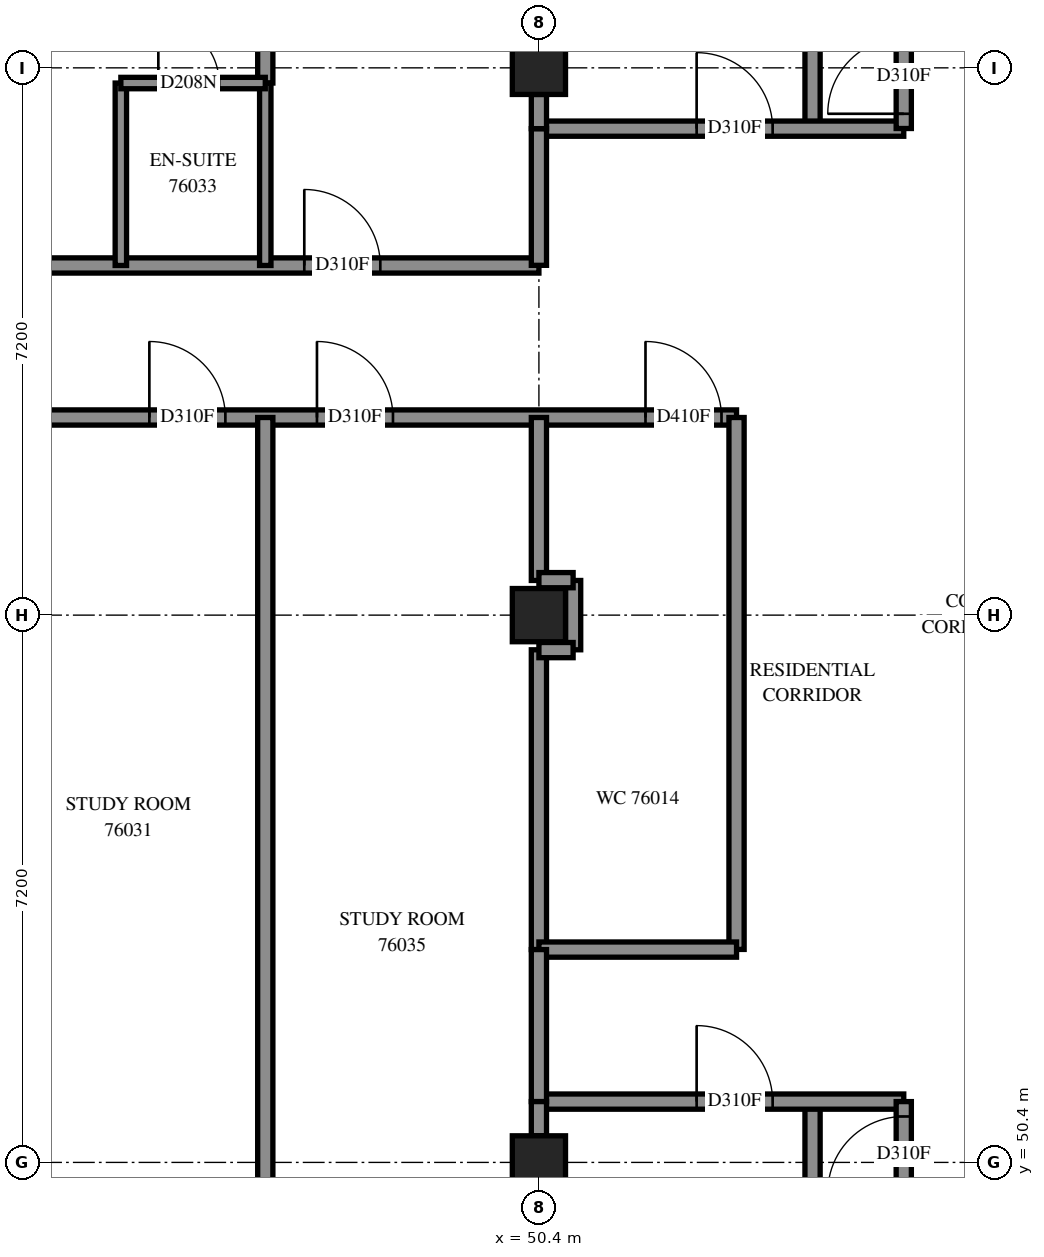
"""IFC4 building model, lengths in metres.
Left out: names, types, materials, properties, quantities, classifications, styles, units other than length and angle.
Written with IfcOpenShell. Run it as: python <this file> out.ifc"""

import sys

from ifc_helpers import new_model, si_unit, direction, frame, frame_2d, origin, origin_2d, place, context, subcontext, project, spatial, rectangle, extrude, element, fill, save


model = new_model("IFC4")
c1 = context("Model", 3, precision=1e-05, world=origin(), true_north=direction((0.0, 1.0)))
c2 = subcontext(c1, "Body", "Model", "MODEL_VIEW")
j1 = project(units=[si_unit("LENGTHUNIT", "METRE"), si_unit("PLANEANGLEUNIT", "RADIAN")], contexts=[c1])
p1 = place(None, origin())
s1 = spatial("IfcSite", under=j1, at=p1, CompositionType="ELEMENT")
p2 = place(p1, origin())
s2 = spatial("IfcBuilding", under=s1, at=p2, CompositionType="ELEMENT")
p3 = place(p2, frame((0.0, 0.0, 277.8)))
s3 = spatial("IfcBuildingStorey", under=s2, at=p3, CompositionType="ELEMENT", Elevation=277.8)
for number, where, z_axis, x_axis in (
    (1, (50.4, 50.4, 0.0), (0.0, 0.0, 1.0), (1.0, 0.0, 0.0)),
    (2, (50.4, 57.6, 0.0), (0.0, 0.0, 1.0), (1.0, 0.0, 0.0)),
    (3, (50.4, 64.8, 0.0), (0.0, 0.0, 1.0), (1.0, 0.0, 0.0)),
):
    element("IfcColumn", number, at=place(p3, frame(where, z_axis=z_axis, x_axis=x_axis)), inside=s3, PredefinedType="COLUMN", context=c2, shape_type="SweptSolid", body=[
        extrude(rectangle(XDim=0.7, YDim=0.7, at=origin_2d()), origin(), (0.0, 0.0, 1.0), 3.1),
    ])
p4 = place(p3, frame((36.0, 60.2, 0.0), z_axis=(0.0, 0.0, 1.0), x_axis=(1.0, 0.0, 0.0)))
e4 = element("IfcWall", 4, at=p4, inside=s3, PredefinedType="PARTITIONING", context=c2, shape_type="SweptSolid", body=[
    extrude(rectangle(XDim=17.0, YDim=0.2, at=frame_2d((8.5, 0.0))), origin(), (0.0, 0.0, 1.0), 3.1),
])
p5 = place(p4, frame((15.802, 0.0, 0.0)))
e5 = element("IfcOpeningElement", 5, at=p5, cuts=e4, PredefinedType="OPENING", context=c2, shape_type="SweptSolid", body=[
    extrude(rectangle(XDim=1.0, YDim=2.1, at=frame_2d((0.5, 1.05))), frame((0.0, 0.11, 0.0), z_axis=(0.0, -1.0, 0.0), x_axis=(1.0, 0.0, 0.0)), (0.0, 0.0, 1.0), 0.22),
])
p6 = place(p4, frame((2.075, 0.0, 0.0)))
e6 = element("IfcOpeningElement", 6, at=p6, cuts=e4, PredefinedType="OPENING", context=c2, shape_type="SweptSolid", body=[
    extrude(rectangle(XDim=1.0, YDim=2.1, at=frame_2d((0.5, 1.05))), frame((0.0, 0.11, 0.0), z_axis=(0.0, -1.0, 0.0), x_axis=(1.0, 0.0, 0.0)), (0.0, 0.0, 1.0), 0.22),
])
p7 = place(p4, frame((4.125, 0.0, 0.0)))
e7 = element("IfcOpeningElement", 7, at=p7, cuts=e4, PredefinedType="OPENING", context=c2, shape_type="SweptSolid", body=[
    extrude(rectangle(XDim=1.0, YDim=2.1, at=frame_2d((0.5, 1.05))), frame((0.0, 0.11, 0.0), z_axis=(0.0, -1.0, 0.0), x_axis=(1.0, 0.0, 0.0)), (0.0, 0.0, 1.0), 0.22),
])
p8 = place(p4, frame((9.275, 0.0, 0.0)))
e8 = element("IfcOpeningElement", 8, at=p8, cuts=e4, PredefinedType="OPENING", context=c2, shape_type="SweptSolid", body=[
    extrude(rectangle(XDim=1.0, YDim=2.1, at=frame_2d((0.5, 1.05))), frame((0.0, 0.11, 0.0), z_axis=(0.0, -1.0, 0.0), x_axis=(1.0, 0.0, 0.0)), (0.0, 0.0, 1.0), 0.22),
])
p9 = place(p4, frame((11.48, 0.0, 0.0)))
e9 = element("IfcOpeningElement", 9, at=p9, cuts=e4, PredefinedType="OPENING", context=c2, shape_type="SweptSolid", body=[
    extrude(rectangle(XDim=1.0, YDim=2.1, at=frame_2d((0.5, 1.05))), frame((0.0, 0.11, 0.0), z_axis=(0.0, -1.0, 0.0), x_axis=(1.0, 0.0, 0.0)), (0.0, 0.0, 1.0), 0.22),
])
p10 = place(p3, frame((46.8, 49.65, 0.0), z_axis=(0.0, 0.0, 1.0), x_axis=(0.0, 1.0, 0.0)))
e10 = element("IfcWall", 10, at=p10, inside=s3, PredefinedType="PARTITIONING", context=c2, shape_type="SweptSolid", body=[
    extrude(rectangle(XDim=10.55, YDim=0.2, at=frame_2d((5.275, 0.0))), origin(), (0.0, 0.0, 1.0), 3.1),
])
p11 = place(p3, frame((40.602, 62.2, 0.0), z_axis=(0.0, 0.0, 1.0), x_axis=(1.0, 0.0, 0.0)))
e11 = element("IfcWall", 11, at=p11, inside=s3, PredefinedType="PARTITIONING", context=c2, shape_type="SweptSolid", body=[
    extrude(rectangle(XDim=9.798, YDim=0.2, at=frame_2d((4.899, 0.0))), origin(), (0.0, 0.0, 1.0), 3.1),
])
p12 = place(p11, frame((1.306, 0.0, 0.0)))
e12 = element("IfcOpeningElement", 12, at=p12, cuts=e11, PredefinedType="OPENING", context=c2, shape_type="SweptSolid", body=[
    extrude(rectangle(XDim=0.9, YDim=2.1, at=frame_2d((0.45, 1.05))), frame((0.0, 0.11, 0.0), z_axis=(0.0, -1.0, 0.0), x_axis=(1.0, 0.0, 0.0)), (0.0, 0.0, 1.0), 0.22),
])
p13 = place(p11, frame((6.711, 0.0, 0.0)))
e13 = element("IfcOpeningElement", 13, at=p13, cuts=e11, PredefinedType="OPENING", context=c2, shape_type="SweptSolid", body=[
    extrude(rectangle(XDim=1.0, YDim=2.1, at=frame_2d((0.5, 1.05))), frame((0.0, 0.11, 0.0), z_axis=(0.0, -1.0, 0.0), x_axis=(1.0, 0.0, 0.0)), (0.0, 0.0, 1.0), 0.22),
])
p14 = place(p3, frame((54.0, 64.0, 0.0), z_axis=(0.0, 0.0, 1.0), x_axis=(0.0, 1.0, 0.0)))
e14 = element("IfcWall", 14, at=p14, inside=s3, PredefinedType="PARTITIONING", context=c2, shape_type="SweptSolid", body=[
    extrude(rectangle(XDim=8.855, YDim=0.2, at=frame_2d((4.428, 0.0))), origin(), (0.0, 0.0, 1.0), 3.1),
])
p15 = place(p3, frame((54.0, 42.45, 0.0), z_axis=(0.0, 0.0, 1.0), x_axis=(0.0, 1.0, 0.0)))
e15 = element("IfcWall", 15, at=p15, inside=s3, PredefinedType="PARTITIONING", context=c2, shape_type="SweptSolid", body=[
    extrude(rectangle(XDim=8.75, YDim=0.2, at=frame_2d((4.375, 0.0))), origin(), (0.0, 0.0, 1.0), 3.1),
])
p16 = place(p3, frame((46.8, 64.6, 0.0), z_axis=(0.0, 0.0, 1.0), x_axis=(0.0, 1.0, 0.0)))
e16 = element("IfcWall", 16, at=p16, inside=s3, PredefinedType="PARTITIONING", context=c2, shape_type="SweptSolid", body=[
    extrude(rectangle(XDim=8.15, YDim=0.2, at=frame_2d((4.075, 0.0))), origin(), (0.0, 0.0, 1.0), 3.1),
])
p17 = place(p3, frame((53.0, 53.202, 0.0), z_axis=(0.0, 0.0, 1.0), x_axis=(0.0, 1.0, 0.0)))
e17 = element("IfcWall", 17, at=p17, inside=s3, PredefinedType="PARTITIONING", context=c2, shape_type="SweptSolid", body=[
    extrude(rectangle(XDim=6.998, YDim=0.2, at=frame_2d((3.499, 0.0))), origin(), (0.0, 0.0, 1.0), 3.1),
])
p18 = place(p3, frame((50.4, 51.2, 0.0), z_axis=(0.0, 0.0, 1.0), x_axis=(1.0, 0.0, 0.0)))
e18 = element("IfcWall", 18, at=p18, inside=s3, PredefinedType="PARTITIONING", context=c2, shape_type="SweptSolid", body=[
    extrude(rectangle(XDim=4.8, YDim=0.2, at=frame_2d((2.4, 0.0))), origin(), (0.0, 0.0, 1.0), 3.1),
])
p19 = place(p18, frame((2.075, 0.0, 0.0)))
e19 = element("IfcOpeningElement", 19, at=p19, cuts=e18, PredefinedType="OPENING", context=c2, shape_type="SweptSolid", body=[
    extrude(rectangle(XDim=1.0, YDim=2.1, at=frame_2d((0.5, 1.05))), frame((0.0, 0.11, 0.0), z_axis=(0.0, -1.0, 0.0), x_axis=(1.0, 0.0, 0.0)), (0.0, 0.0, 1.0), 0.22),
])
p20 = place(p3, frame((50.4, 64.0, 0.0), z_axis=(0.0, 0.0, 1.0), x_axis=(1.0, 0.0, 0.0)))
e20 = element("IfcWall", 20, at=p20, inside=s3, PredefinedType="PARTITIONING", context=c2, shape_type="SweptSolid", body=[
    extrude(rectangle(XDim=4.8, YDim=0.2, at=frame_2d((2.4, 0.0))), origin(), (0.0, 0.0, 1.0), 3.1),
])
p21 = place(p20, frame((2.075, 0.0, 0.0)))
e21 = element("IfcOpeningElement", 21, at=p21, cuts=e20, PredefinedType="OPENING", context=c2, shape_type="SweptSolid", body=[
    extrude(rectangle(XDim=1.0, YDim=2.1, at=frame_2d((0.5, 1.05))), frame((0.0, 0.11, 0.0), z_axis=(0.0, -1.0, 0.0), x_axis=(1.0, 0.0, 0.0)), (0.0, 0.0, 1.0), 0.22),
])
p22 = place(p3, frame((50.4, 53.2, 0.0), z_axis=(0.0, 0.0, 1.0), x_axis=(0.0, 1.0, 0.0)))
e22 = element("IfcWall", 22, at=p22, inside=s3, PredefinedType="PARTITIONING", context=c2, shape_type="SweptSolid", body=[
    extrude(rectangle(XDim=3.944, YDim=0.2, at=frame_2d((1.972, 0.0))), origin(), (0.0, 0.0, 1.0), 3.1),
])
p23 = place(p3, frame((55.2, 48.0, 0.0), z_axis=(0.0, 0.0, 1.0), x_axis=(0.0, 1.0, 0.0)))
e23 = element("IfcWall", 23, at=p23, inside=s3, PredefinedType="PARTITIONING", context=c2, shape_type="SweptSolid", body=[
    extrude(rectangle(XDim=3.2, YDim=0.2, at=frame_2d((1.6, 0.0))), origin(), (0.0, 0.0, 1.0), 3.1),
])
p24 = place(p23, frame((2.004, 0.0, 0.0)))
e24 = element("IfcOpeningElement", 24, at=p24, cuts=e23, PredefinedType="OPENING", context=c2, shape_type="SweptSolid", body=[
    extrude(rectangle(XDim=1.0, YDim=2.1, at=frame_2d((0.5, 1.05))), frame((0.0, 0.11, 0.0), z_axis=(0.0, -1.0, 0.0), x_axis=(1.0, 0.0, 0.0)), (0.0, 0.0, 1.0), 0.22),
])
p25 = place(p3, frame((55.2, 64.002, 0.0), z_axis=(0.0, 0.0, 1.0), x_axis=(0.0, 1.0, 0.0)))
e25 = element("IfcWall", 25, at=p25, inside=s3, PredefinedType="PARTITIONING", context=c2, shape_type="SweptSolid", body=[
    extrude(rectangle(XDim=3.198, YDim=0.2, at=frame_2d((1.599, 0.0))), origin(), (0.0, 0.0, 1.0), 3.1),
])
p26 = place(p25, frame((0.194, 0.0, 0.0)))
e26 = element("IfcOpeningElement", 26, at=p26, cuts=e25, PredefinedType="OPENING", context=c2, shape_type="SweptSolid", body=[
    extrude(rectangle(XDim=1.0, YDim=2.1, at=frame_2d((0.5, 1.05))), frame((0.0, 0.11, 0.0), z_axis=(0.0, -1.0, 0.0), x_axis=(1.0, 0.0, 0.0)), (0.0, 0.0, 1.0), 0.22),
])
p27 = place(p3, frame((50.4, 53.2, 0.0), z_axis=(0.0, 0.0, 1.0), x_axis=(1.0, 0.0, 0.0)))
e27 = element("IfcWall", 27, at=p27, inside=s3, PredefinedType="PARTITIONING", context=c2, shape_type="SweptSolid", body=[
    extrude(rectangle(XDim=2.6, YDim=0.2, at=frame_2d((1.3, 0.0))), origin(), (0.0, 0.0, 1.0), 3.1),
])
for number, where, z_axis, x_axis in (
    (28, (44.9, 62.2, 0.0), (0.0, 0.0, 1.0), (0.0, 1.0, 0.0)),
    (29, (46.8, 62.2, 0.0), (0.0, 0.0, 1.0), (0.0, 1.0, 0.0)),
):
    element("IfcWall", number, at=place(p3, frame(where, z_axis=z_axis, x_axis=x_axis)), inside=s3, PredefinedType="PARTITIONING", context=c2, shape_type="SweptSolid", body=[
        extrude(rectangle(XDim=2.4, YDim=0.15, at=frame_2d((1.2, 0.0))), origin(), (0.0, 0.0, 1.0), 3.1),
    ])
p28 = place(p3, frame((50.4, 58.056, 0.0), z_axis=(0.0, 0.0, 1.0), x_axis=(0.0, 1.0, 0.0)))
e30 = element("IfcWall", 30, at=p28, inside=s3, PredefinedType="PARTITIONING", context=c2, shape_type="SweptSolid", body=[
    extrude(rectangle(XDim=2.144, YDim=0.2, at=frame_2d((1.072, 0.0))), origin(), (0.0, 0.0, 1.0), 3.1),
])
p29 = place(p3, frame((50.4, 51.2, 0.0), z_axis=(0.0, 0.0, 1.0), x_axis=(0.0, 1.0, 0.0)))
e31 = element("IfcWall", 31, at=p29, inside=s3, PredefinedType="PARTITIONING", context=c2, shape_type="SweptSolid", body=[
    extrude(rectangle(XDim=2.0, YDim=0.2, at=frame_2d((1.0, 0.0))), origin(), (0.0, 0.0, 1.0), 3.1),
])
p30 = place(p3, frame((44.9, 64.6, 0.0), z_axis=(0.0, 0.0, 1.0), x_axis=(1.0, 0.0, 0.0)))
e32 = element("IfcWall", 32, at=p30, inside=s3, PredefinedType="PARTITIONING", context=c2, shape_type="SweptSolid", body=[
    extrude(rectangle(XDim=1.9, YDim=0.15, at=frame_2d((0.95, 0.0))), origin(), (0.0, 0.0, 1.0), 3.1),
])
p31 = place(p30, frame((0.493, 0.0, 0.0)))
e33 = element("IfcOpeningElement", 33, at=p31, cuts=e32, PredefinedType="OPENING", context=c2, shape_type="SweptSolid", body=[
    extrude(rectangle(XDim=0.8, YDim=2.1, at=frame_2d((0.4, 1.05))), frame((0.0, 0.085, 0.0), z_axis=(0.0, -1.0, 0.0), x_axis=(1.0, 0.0, 0.0)), (0.0, 0.0, 1.0), 0.17),
])
p32 = place(p3, frame((50.4, 62.202, 0.0), z_axis=(0.0, 0.0, 1.0), x_axis=(0.0, 1.0, 0.0)))
e34 = element("IfcWall", 34, at=p32, inside=s3, PredefinedType="PARTITIONING", context=c2, shape_type="SweptSolid", body=[
    extrude(rectangle(XDim=1.798, YDim=0.2, at=frame_2d((0.899, 0.0))), origin(), (0.0, 0.0, 1.0), 3.1),
])
p33 = place(p3, frame((50.85, 57.144, 0.0), z_axis=(0.0, 0.0, 1.0), x_axis=(0.0, 1.0, 0.0)))
e35 = element("IfcWall", 35, at=p33, inside=s3, PredefinedType="PARTITIONING", context=c2, shape_type="SweptSolid", body=[
    extrude(rectangle(XDim=0.912, YDim=0.2, at=frame_2d((0.456, 0.0))), origin(), (0.0, 0.0, 1.0), 3.1),
])
for number, where, z_axis, x_axis in (
    (36, (50.4, 50.75, 0.0), (0.0, 0.0, 1.0), (0.0, 1.0, 0.0)),
    (37, (50.4, 64.0, 0.0), (0.0, 0.0, 1.0), (0.0, 1.0, 0.0)),
    (38, (50.4, 57.14, 0.0), (0.0, 0.0, 1.0), (1.0, 0.0, 0.0)),
    (39, (50.4, 58.06, 0.0), (0.0, 0.0, 1.0), (1.0, 0.0, 0.0)),
):
    element("IfcWall", number, at=place(p3, frame(where, z_axis=z_axis, x_axis=x_axis)), inside=s3, PredefinedType="PARTITIONING", context=c2, shape_type="SweptSolid", body=[
        extrude(rectangle(XDim=0.45, YDim=0.2, at=frame_2d((0.225, 0.0))), origin(), (0.0, 0.0, 1.0), 3.1),
    ])
p34 = place(p5, origin())
e40 = element("IfcDoor", 40, at=p34, inside=s3, OperationType="SINGLE_SWING_LEFT", PredefinedType="DOOR", context=c2, shape_type="SweptSolid", body=[
    extrude(rectangle(XDim=1.0, YDim=2.1, at=frame_2d((0.5, 1.05))), frame((0.0, 0.025, 0.0), z_axis=(0.0, -1.0, 0.0), x_axis=(1.0, 0.0, 0.0)), (0.0, 0.0, 1.0), 0.05),
])
fill(e5, e40)
p35 = place(p21, origin())
e41 = element("IfcDoor", 41, at=p35, inside=s3, OperationType="SINGLE_SWING_RIGHT", PredefinedType="DOOR", context=c2, shape_type="SweptSolid", body=[
    extrude(rectangle(XDim=1.0, YDim=2.1, at=frame_2d((0.5, 1.05))), frame((0.0, 0.025, 0.0), z_axis=(0.0, -1.0, 0.0), x_axis=(1.0, 0.0, 0.0)), (0.0, 0.0, 1.0), 0.05),
])
fill(e21, e41)
p36 = place(p26, origin())
e42 = element("IfcDoor", 42, at=p36, inside=s3, OperationType="SINGLE_SWING_LEFT", PredefinedType="DOOR", context=c2, shape_type="SweptSolid", body=[
    extrude(rectangle(XDim=1.0, YDim=2.1, at=frame_2d((0.5, 1.05))), frame((0.0, 0.025, 0.0), z_axis=(0.0, -1.0, 0.0), x_axis=(1.0, 0.0, 0.0)), (0.0, 0.0, 1.0), 0.05),
])
fill(e26, e42)
p37 = place(p8, origin())
e43 = element("IfcDoor", 43, at=p37, inside=s3, OperationType="SINGLE_SWING_LEFT", PredefinedType="DOOR", context=c2, shape_type="SweptSolid", body=[
    extrude(rectangle(XDim=1.0, YDim=2.1, at=frame_2d((0.5, 1.05))), frame((0.0, 0.025, 0.0), z_axis=(0.0, -1.0, 0.0), x_axis=(1.0, 0.0, 0.0)), (0.0, 0.0, 1.0), 0.05),
])
fill(e8, e43)
p38 = place(p31, origin())
e44 = element("IfcDoor", 44, at=p38, inside=s3, OperationType="SINGLE_SWING_RIGHT", PredefinedType="DOOR", context=c2, shape_type="SweptSolid", body=[
    extrude(rectangle(XDim=0.8, YDim=2.1, at=frame_2d((0.4, 1.05))), frame((0.0, 0.025, 0.0), z_axis=(0.0, -1.0, 0.0), x_axis=(1.0, 0.0, 0.0)), (0.0, 0.0, 1.0), 0.05),
])
fill(e33, e44)
p39 = place(p13, origin())
e45 = element("IfcDoor", 45, at=p39, inside=s3, OperationType="SINGLE_SWING_LEFT", PredefinedType="DOOR", context=c2, shape_type="SweptSolid", body=[
    extrude(rectangle(XDim=1.0, YDim=2.1, at=frame_2d((0.5, 1.05))), frame((0.0, 0.025, 0.0), z_axis=(0.0, -1.0, 0.0), x_axis=(1.0, 0.0, 0.0)), (0.0, 0.0, 1.0), 0.05),
])
fill(e13, e45)
p40 = place(p9, origin())
e46 = element("IfcDoor", 46, at=p40, inside=s3, OperationType="SINGLE_SWING_RIGHT", PredefinedType="DOOR", context=c2, shape_type="SweptSolid", body=[
    extrude(rectangle(XDim=1.0, YDim=2.1, at=frame_2d((0.5, 1.05))), frame((0.0, 0.025, 0.0), z_axis=(0.0, -1.0, 0.0), x_axis=(1.0, 0.0, 0.0)), (0.0, 0.0, 1.0), 0.05),
])
fill(e9, e46)
p41 = place(p19, origin())
e47 = element("IfcDoor", 47, at=p41, inside=s3, OperationType="SINGLE_SWING_LEFT", PredefinedType="DOOR", context=c2, shape_type="SweptSolid", body=[
    extrude(rectangle(XDim=1.0, YDim=2.1, at=frame_2d((0.5, 1.05))), frame((0.0, 0.025, 0.0), z_axis=(0.0, -1.0, 0.0), x_axis=(1.0, 0.0, 0.0)), (0.0, 0.0, 1.0), 0.05),
])
fill(e19, e47)
p42 = place(p24, origin())
e48 = element("IfcDoor", 48, at=p42, inside=s3, OperationType="SINGLE_SWING_RIGHT", PredefinedType="DOOR", context=c2, shape_type="SweptSolid", body=[
    extrude(rectangle(XDim=1.0, YDim=2.1, at=frame_2d((0.5, 1.05))), frame((0.0, 0.025, 0.0), z_axis=(0.0, -1.0, 0.0), x_axis=(1.0, 0.0, 0.0)), (0.0, 0.0, 1.0), 0.05),
])
fill(e24, e48)
save(model, sys.argv[1])
